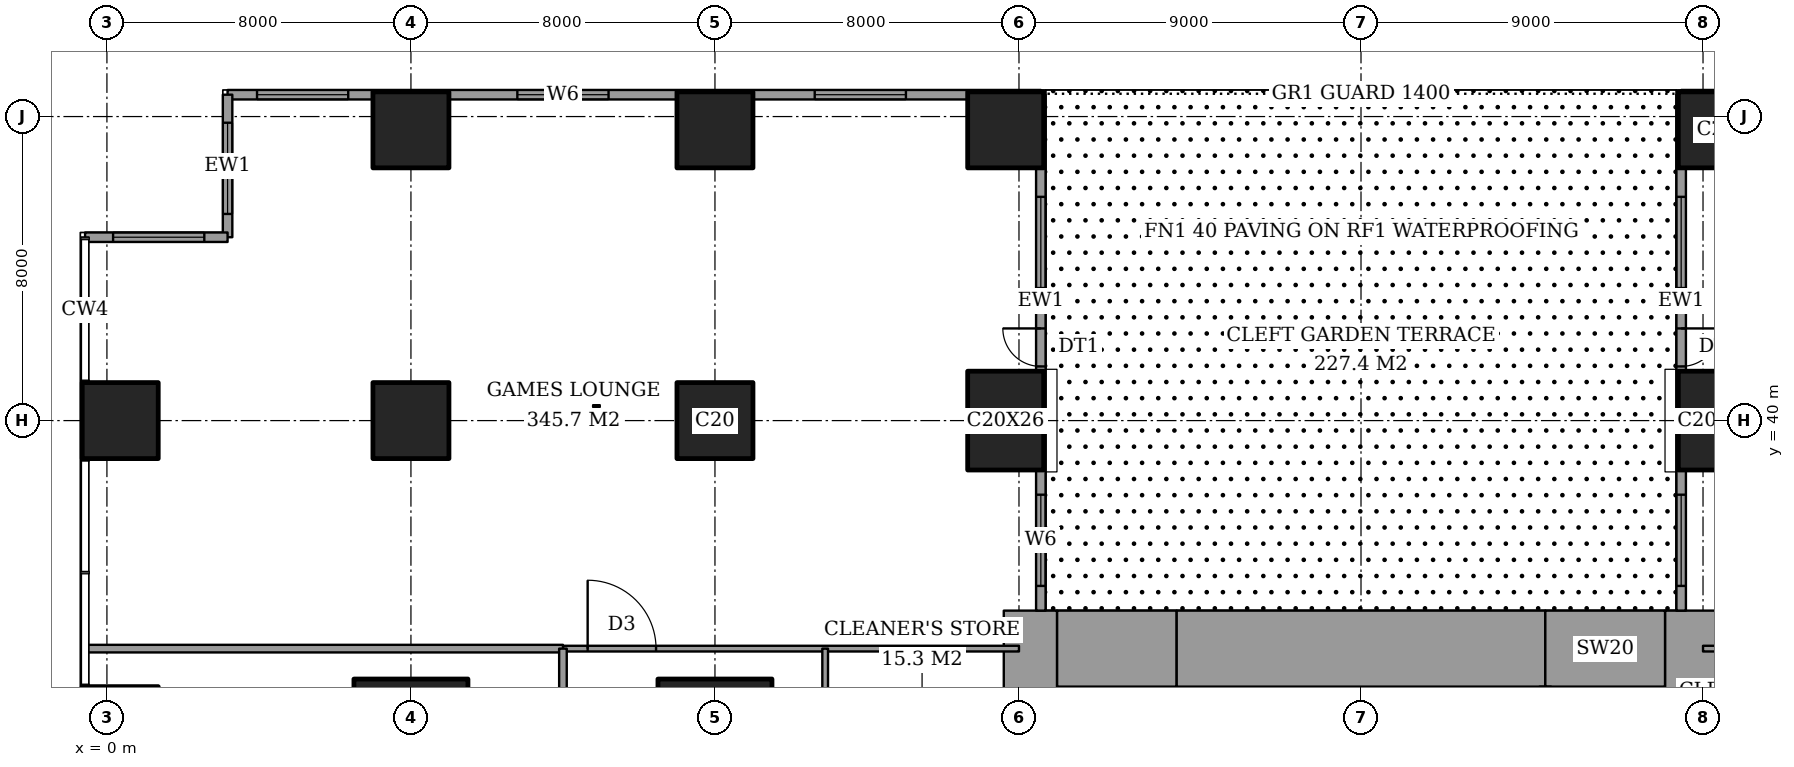
"""IFC4 building model, lengths in metres.
Left out: names, types, materials, properties, quantities, classifications, styles, units other than length and angle.
Written with IfcOpenShell. Run it as: python <this file> out.ifc"""

import sys

from ifc_helpers import new_model, si_unit, direction, frame, frame_2d, origin, origin_2d, place, context, subcontext, project, spatial, rectangle, extrude, element, fill, save


model = new_model("IFC4")
c1 = context("Model", 3, precision=1e-05, world=origin(), true_north=direction((0.0, 1.0)))
c2 = subcontext(c1, "Body", "Model", "MODEL_VIEW")
j1 = project(units=[si_unit("LENGTHUNIT", "METRE"), si_unit("PLANEANGLEUNIT", "RADIAN")], contexts=[c1])
p1 = place(None, origin())
s1 = spatial("IfcSite", under=j1, at=p1, CompositionType="ELEMENT")
p2 = place(p1, origin())
s2 = spatial("IfcBuilding", under=s1, at=p2, CompositionType="ELEMENT")
p3 = place(p2, frame((0.0, 0.0, 26.0)))
s3 = spatial("IfcBuildingStorey", under=s2, at=p3, CompositionType="ELEMENT", Elevation=26.0)
p4 = place(p3, frame((0.35, 40.0, 0.0), z_axis=(0.0, 0.0, 1.0), x_axis=(1.0, 0.0, 0.0)))
e1 = element("IfcColumn", 1, at=p4, inside=s3, PredefinedType="COLUMN", context=c2, shape_type="SweptSolid", body=[
    extrude(rectangle(XDim=2.0, YDim=2.0, at=origin_2d()), origin(), (0.0, 0.0, 1.0), 3.6),
])
p5 = place(p3, frame((8.0, 32.0, 0.0), z_axis=(0.0, 0.0, 1.0), x_axis=(1.0, 0.0, 0.0)))
e2 = element("IfcColumn", 2, at=p5, inside=s3, PredefinedType="COLUMN", context=c2, shape_type="SweptSolid", body=[
    extrude(rectangle(XDim=3.0, YDim=2.4, at=origin_2d()), origin(), (0.0, 0.0, 1.0), 3.6),
])
for number, where, z_axis, x_axis in (
    (3, (8.0, 40.0, 0.0), (0.0, 0.0, 1.0), (1.0, 0.0, 0.0)),
    (4, (8.0, 47.65, 0.0), (0.0, 0.0, 1.0), (1.0, 0.0, 0.0)),
):
    element("IfcColumn", number, at=place(p3, frame(where, z_axis=z_axis, x_axis=x_axis)), inside=s3, PredefinedType="COLUMN", context=c2, shape_type="SweptSolid", body=[
        extrude(rectangle(XDim=2.0, YDim=2.0, at=origin_2d()), origin(), (0.0, 0.0, 1.0), 3.6),
    ])
p6 = place(p3, frame((16.0, 32.0, 0.0), z_axis=(0.0, 0.0, 1.0), x_axis=(1.0, 0.0, 0.0)))
e5 = element("IfcColumn", 5, at=p6, inside=s3, PredefinedType="COLUMN", context=c2, shape_type="SweptSolid", body=[
    extrude(rectangle(XDim=3.0, YDim=2.4, at=origin_2d()), origin(), (0.0, 0.0, 1.0), 3.6),
])
for number, where, z_axis, x_axis in (
    (6, (16.0, 40.0, 0.0), (0.0, 0.0, 1.0), (1.0, 0.0, 0.0)),
    (7, (16.0, 47.65, 0.0), (0.0, 0.0, 1.0), (1.0, 0.0, 0.0)),
):
    element("IfcColumn", number, at=place(p3, frame(where, z_axis=z_axis, x_axis=x_axis)), inside=s3, PredefinedType="COLUMN", context=c2, shape_type="SweptSolid", body=[
        extrude(rectangle(XDim=2.0, YDim=2.0, at=origin_2d()), origin(), (0.0, 0.0, 1.0), 3.6),
    ])
p7 = place(p3, frame((23.65, 40.0, 0.0), z_axis=(0.0, 0.0, 1.0), x_axis=(1.0, 0.0, 0.0)))
e8 = element("IfcColumn", 8, at=p7, inside=s3, PredefinedType="COLUMN", context=c2, shape_type="SweptSolid", body=[
    extrude(rectangle(XDim=2.0, YDim=2.6, at=origin_2d()), origin(), (0.0, 0.0, 1.0), 3.6),
])
p8 = place(p3, frame((23.65, 47.65, 0.0), z_axis=(0.0, 0.0, 1.0), x_axis=(1.0, 0.0, 0.0)))
e9 = element("IfcColumn", 9, at=p8, inside=s3, PredefinedType="COLUMN", context=c2, shape_type="SweptSolid", body=[
    extrude(rectangle(XDim=2.0, YDim=2.0, at=origin_2d()), origin(), (0.0, 0.0, 1.0), 3.6),
])
p9 = place(p3, frame((42.35, 40.0, 0.0), z_axis=(0.0, 0.0, 1.0), x_axis=(1.0, 0.0, 0.0)))
e10 = element("IfcColumn", 10, at=p9, inside=s3, PredefinedType="COLUMN", context=c2, shape_type="SweptSolid", body=[
    extrude(rectangle(XDim=2.0, YDim=2.6, at=origin_2d()), origin(), (0.0, 0.0, 1.0), 3.6),
])
p10 = place(p3, frame((42.35, 47.65, 0.0), z_axis=(0.0, 0.0, 1.0), x_axis=(1.0, 0.0, 0.0)))
e11 = element("IfcColumn", 11, at=p10, inside=s3, PredefinedType="COLUMN", context=c2, shape_type="SweptSolid", body=[
    extrude(rectangle(XDim=2.0, YDim=2.0, at=origin_2d()), origin(), (0.0, 0.0, 1.0), 3.6),
])
p11 = place(p3, frame((25.0, 34.0, 0.0), z_axis=(0.0, 0.0, 1.0), x_axis=(1.0, 0.0, 0.0)))
e12 = element("IfcWall", 12, at=p11, inside=s3, PredefinedType="SHEAR", context=c2, shape_type="SweptSolid", body=[
    extrude(rectangle(XDim=3.15, YDim=2.0, at=frame_2d((1.575, 0.0))), origin(), (0.0, 0.0, 1.0), 3.6),
])
p12 = place(p3, frame((28.15, 34.0, 0.0), z_axis=(0.0, 0.0, 1.0), x_axis=(1.0, 0.0, 0.0)))
e13 = element("IfcWall", 13, at=p12, inside=s3, PredefinedType="SHEAR", context=c2, shape_type="SweptSolid", body=[
    extrude(rectangle(XDim=9.7, YDim=2.0, at=frame_2d((4.85, 0.0))), origin(), (0.0, 0.0, 1.0), 3.6),
])
p13 = place(p3, frame((37.85, 34.0, 0.0), z_axis=(0.0, 0.0, 1.0), x_axis=(1.0, 0.0, 0.0)))
e14 = element("IfcWall", 14, at=p13, inside=s3, PredefinedType="SHEAR", context=c2, shape_type="SweptSolid", body=[
    extrude(rectangle(XDim=3.15, YDim=2.0, at=frame_2d((1.575, 0.0))), origin(), (0.0, 0.0, 1.0), 3.6),
])
p14 = place(p3, frame((24.3, 23.15, 0.0), z_axis=(0.0, 0.0, 1.0), x_axis=(0.0, 1.0, 0.0)))
e15 = element("IfcWall", 15, at=p14, inside=s3, PredefinedType="SHEAR", context=c2, shape_type="SweptSolid", body=[
    extrude(rectangle(XDim=11.85, YDim=1.4, at=frame_2d((5.925, 0.0))), origin(), (0.0, 0.0, 1.0), 3.6),
])
p15 = place(p14, frame((0.75, 0.0, 0.0)))
e16 = element("IfcOpeningElement", 16, at=p15, cuts=e15, PredefinedType="OPENING", context=c2, shape_type="SweptSolid", body=[
    extrude(rectangle(XDim=1.8, YDim=2.4, at=frame_2d((0.9, 1.2))), frame((0.0, 0.71, 0.0), z_axis=(0.0, -1.0, 0.0), x_axis=(1.0, 0.0, 0.0)), (0.0, 0.0, 1.0), 1.42),
])
p16 = place(p3, frame((41.7, 24.85, 0.0), z_axis=(0.0, 0.0, 1.0), x_axis=(0.0, 1.0, 0.0)))
e17 = element("IfcWall", 17, at=p16, inside=s3, PredefinedType="SHEAR", context=c2, shape_type="SweptSolid", body=[
    extrude(rectangle(XDim=10.15, YDim=1.4, at=frame_2d((5.075, 0.0))), origin(), (0.0, 0.0, 1.0), 3.6),
])
p17 = place(p3, frame((62.825, 48.575, 0.0), z_axis=(0.0, 0.0, 1.0), x_axis=(-1.0, 0.0, 0.0)))
e18 = element("IfcWall", 18, at=p17, inside=s3, PredefinedType="SOLIDWALL", context=c2, shape_type="SweptSolid", body=[
    extrude(rectangle(XDim=21.4, YDim=0.25, at=frame_2d((10.7, 0.0))), origin(), (0.0, 0.0, 1.0), 3.6),
])
p18 = place(p17, frame((0.725, 0.0, 0.6)))
e19 = element("IfcOpeningElement", 19, at=p18, cuts=e18, PredefinedType="OPENING", context=c2, shape_type="SweptSolid", body=[
    extrude(rectangle(XDim=2.4, YDim=2.0, at=frame_2d((1.2, 1.0))), frame((0.0, 0.135, 0.0), z_axis=(0.0, -1.0, 0.0), x_axis=(1.0, 0.0, 0.0)), (0.0, 0.0, 1.0), 0.27),
])
p19 = place(p17, frame((7.625, 0.0, 0.6)))
e20 = element("IfcOpeningElement", 20, at=p19, cuts=e18, PredefinedType="OPENING", context=c2, shape_type="SweptSolid", body=[
    extrude(rectangle(XDim=2.4, YDim=2.0, at=frame_2d((1.2, 1.0))), frame((0.0, 0.135, 0.0), z_axis=(0.0, -1.0, 0.0), x_axis=(1.0, 0.0, 0.0)), (0.0, 0.0, 1.0), 0.27),
])
p20 = place(p17, frame((15.5, 0.0, 0.6)))
e21 = element("IfcOpeningElement", 21, at=p20, cuts=e18, PredefinedType="OPENING", context=c2, shape_type="SweptSolid", body=[
    extrude(rectangle(XDim=2.4, YDim=2.0, at=frame_2d((1.2, 1.0))), frame((0.0, 0.135, 0.0), z_axis=(0.0, -1.0, 0.0), x_axis=(1.0, 0.0, 0.0)), (0.0, 0.0, 1.0), 0.27),
])
p21 = place(p3, frame((41.425, 48.575, 0.0), z_axis=(0.0, 0.0, 1.0), x_axis=(0.0, -1.0, 0.0)))
e22 = element("IfcWall", 22, at=p21, inside=s3, PredefinedType="SOLIDWALL", context=c2, shape_type="SweptSolid", body=[
    extrude(rectangle(XDim=13.575, YDim=0.25, at=frame_2d((6.788, 0.0))), origin(), (0.0, 0.0, 1.0), 3.6),
])
p22 = place(p21, frame((6.15, 0.0, 0.0)))
e23 = element("IfcOpeningElement", 23, at=p22, cuts=e22, PredefinedType="OPENING", context=c2, shape_type="SweptSolid", body=[
    extrude(rectangle(XDim=1.0, YDim=2.4, at=frame_2d((0.5, 1.2))), frame((0.0, 0.135, 0.0), z_axis=(0.0, -1.0, 0.0), x_axis=(1.0, 0.0, 0.0)), (0.0, 0.0, 1.0), 0.27),
])
p23 = place(p21, frame((2.688, 0.0, 0.6)))
e24 = element("IfcOpeningElement", 24, at=p23, cuts=e22, PredefinedType="OPENING", context=c2, shape_type="SweptSolid", body=[
    extrude(rectangle(XDim=2.4, YDim=2.0, at=frame_2d((1.2, 1.0))), frame((0.0, 0.135, 0.0), z_axis=(0.0, -1.0, 0.0), x_axis=(1.0, 0.0, 0.0)), (0.0, 0.0, 1.0), 0.27),
])
p24 = place(p21, frame((10.525, 0.0, 0.6)))
e25 = element("IfcOpeningElement", 25, at=p24, cuts=e22, PredefinedType="OPENING", context=c2, shape_type="SweptSolid", body=[
    extrude(rectangle(XDim=2.4, YDim=2.0, at=frame_2d((1.2, 1.0))), frame((0.0, 0.135, 0.0), z_axis=(0.0, -1.0, 0.0), x_axis=(1.0, 0.0, 0.0)), (0.0, 0.0, 1.0), 0.27),
])
p25 = place(p3, frame((24.575, 35.0, 0.0), z_axis=(0.0, 0.0, 1.0), x_axis=(0.0, 1.0, 0.0)))
e26 = element("IfcWall", 26, at=p25, inside=s3, PredefinedType="SOLIDWALL", context=c2, shape_type="SweptSolid", body=[
    extrude(rectangle(XDim=13.575, YDim=0.25, at=frame_2d((6.788, 0.0))), origin(), (0.0, 0.0, 1.0), 3.6),
])
p26 = place(p25, frame((6.425, 0.0, 0.0)))
e27 = element("IfcOpeningElement", 27, at=p26, cuts=e26, PredefinedType="OPENING", context=c2, shape_type="SweptSolid", body=[
    extrude(rectangle(XDim=1.0, YDim=2.4, at=frame_2d((0.5, 1.2))), frame((0.0, 0.135, 0.0), z_axis=(0.0, -1.0, 0.0), x_axis=(1.0, 0.0, 0.0)), (0.0, 0.0, 1.0), 0.27),
])
p27 = place(p25, frame((0.65, 0.0, 0.6)))
e28 = element("IfcOpeningElement", 28, at=p27, cuts=e26, PredefinedType="OPENING", context=c2, shape_type="SweptSolid", body=[
    extrude(rectangle(XDim=2.4, YDim=2.0, at=frame_2d((1.2, 1.0))), frame((0.0, 0.135, 0.0), z_axis=(0.0, -1.0, 0.0), x_axis=(1.0, 0.0, 0.0)), (0.0, 0.0, 1.0), 0.27),
])
p28 = place(p25, frame((8.488, 0.0, 0.6)))
e29 = element("IfcOpeningElement", 29, at=p28, cuts=e26, PredefinedType="OPENING", context=c2, shape_type="SweptSolid", body=[
    extrude(rectangle(XDim=2.4, YDim=2.0, at=frame_2d((1.2, 1.0))), frame((0.0, 0.135, 0.0), z_axis=(0.0, -1.0, 0.0), x_axis=(1.0, 0.0, 0.0)), (0.0, 0.0, 1.0), 0.27),
])
p29 = place(p3, frame((24.575, 48.575, 0.0), z_axis=(0.0, 0.0, 1.0), x_axis=(-1.0, 0.0, 0.0)))
e30 = element("IfcWall", 30, at=p29, inside=s3, PredefinedType="SOLIDWALL", context=c2, shape_type="SweptSolid", body=[
    extrude(rectangle(XDim=21.4, YDim=0.25, at=frame_2d((10.7, 0.0))), origin(), (0.0, 0.0, 1.0), 3.6),
])
p30 = place(p29, frame((3.55, 0.0, 0.6)))
e31 = element("IfcOpeningElement", 31, at=p30, cuts=e30, PredefinedType="OPENING", context=c2, shape_type="SweptSolid", body=[
    extrude(rectangle(XDim=2.4, YDim=2.0, at=frame_2d((1.2, 1.0))), frame((0.0, 0.135, 0.0), z_axis=(0.0, -1.0, 0.0), x_axis=(1.0, 0.0, 0.0)), (0.0, 0.0, 1.0), 0.27),
])
p31 = place(p29, frame((11.375, 0.0, 0.6)))
e32 = element("IfcOpeningElement", 32, at=p31, cuts=e30, PredefinedType="OPENING", context=c2, shape_type="SweptSolid", body=[
    extrude(rectangle(XDim=2.4, YDim=2.0, at=frame_2d((1.2, 1.0))), frame((0.0, 0.135, 0.0), z_axis=(0.0, -1.0, 0.0), x_axis=(1.0, 0.0, 0.0)), (0.0, 0.0, 1.0), 0.27),
])
p32 = place(p29, frame((18.225, 0.0, 0.6)))
e33 = element("IfcOpeningElement", 33, at=p32, cuts=e30, PredefinedType="OPENING", context=c2, shape_type="SweptSolid", body=[
    extrude(rectangle(XDim=2.4, YDim=2.0, at=frame_2d((1.2, 1.0))), frame((0.0, 0.135, 0.0), z_axis=(0.0, -1.0, 0.0), x_axis=(1.0, 0.0, 0.0)), (0.0, 0.0, 1.0), 0.27),
])
p33 = place(p3, frame((3.175, 48.575, 0.0), z_axis=(0.0, 0.0, 1.0), x_axis=(0.0, -1.0, 0.0)))
e34 = element("IfcWall", 34, at=p33, inside=s3, PredefinedType="SOLIDWALL", context=c2, shape_type="SweptSolid", body=[
    extrude(rectangle(XDim=3.75, YDim=0.25, at=frame_2d((1.875, 0.0))), origin(), (0.0, 0.0, 1.0), 3.6),
])
p34 = place(p33, frame((0.738, 0.0, 0.6)))
e35 = element("IfcOpeningElement", 35, at=p34, cuts=e34, PredefinedType="OPENING", context=c2, shape_type="SweptSolid", body=[
    extrude(rectangle(XDim=2.4, YDim=2.0, at=frame_2d((1.2, 1.0))), frame((0.0, 0.135, 0.0), z_axis=(0.0, -1.0, 0.0), x_axis=(1.0, 0.0, 0.0)), (0.0, 0.0, 1.0), 0.27),
])
p35 = place(p3, frame((3.175, 44.825, 0.0), z_axis=(0.0, 0.0, 1.0), x_axis=(-1.0, 0.0, 0.0)))
e36 = element("IfcWall", 36, at=p35, inside=s3, PredefinedType="SOLIDWALL", context=c2, shape_type="SweptSolid", body=[
    extrude(rectangle(XDim=3.75, YDim=0.25, at=frame_2d((1.875, 0.0))), origin(), (0.0, 0.0, 1.0), 3.6),
])
p36 = place(p35, frame((0.613, 0.0, 0.6)))
e37 = element("IfcOpeningElement", 37, at=p36, cuts=e36, PredefinedType="OPENING", context=c2, shape_type="SweptSolid", body=[
    extrude(rectangle(XDim=2.4, YDim=2.0, at=frame_2d((1.2, 1.0))), frame((0.0, 0.135, 0.0), z_axis=(0.0, -1.0, 0.0), x_axis=(1.0, 0.0, 0.0)), (0.0, 0.0, 1.0), 0.27),
])
p37 = place(p3, frame((-0.561, 34.0, 0.0), z_axis=(0.0, 0.0, 1.0), x_axis=(1.0, 0.0, 0.0)))
e38 = element("IfcWall", 38, at=p37, inside=s3, PredefinedType="PARTITIONING", context=c2, shape_type="SweptSolid", body=[
    extrude(rectangle(XDim=12.561, YDim=0.2, at=frame_2d((6.281, 0.0))), origin(), (0.0, 0.0, 1.0), 3.35),
])
p38 = place(p3, frame((12.0, 34.0, 0.0), z_axis=(0.0, 0.0, 1.0), x_axis=(1.0, 0.0, 0.0)))
e39 = element("IfcWall", 39, at=p38, inside=s3, PredefinedType="PARTITIONING", context=c2, shape_type="SweptSolid", body=[
    extrude(rectangle(XDim=12.0, YDim=0.15, at=frame_2d((6.0, 0.0))), origin(), (0.0, 0.0, 1.0), 3.35),
])
p39 = place(p38, frame((0.65, 0.0, 0.0)))
e40 = element("IfcOpeningElement", 40, at=p39, cuts=e39, PredefinedType="OPENING", context=c2, shape_type="SweptSolid", body=[
    extrude(rectangle(XDim=1.8, YDim=2.1, at=frame_2d((0.9, 1.05))), frame((0.0, 0.085, 0.0), z_axis=(0.0, -1.0, 0.0), x_axis=(1.0, 0.0, 0.0)), (0.0, 0.0, 1.0), 0.17),
])
p40 = place(p3, frame((42.0, 34.0, 0.0), z_axis=(0.0, 0.0, 1.0), x_axis=(1.0, 0.0, 0.0)))
e41 = element("IfcWall", 41, at=p40, inside=s3, PredefinedType="PARTITIONING", context=c2, shape_type="SweptSolid", body=[
    extrude(rectangle(XDim=12.0, YDim=0.15, at=frame_2d((6.0, 0.0))), origin(), (0.0, 0.0, 1.0), 3.35),
])
p41 = place(p40, frame((9.55, 0.0, 0.0)))
e42 = element("IfcOpeningElement", 42, at=p41, cuts=e41, PredefinedType="OPENING", context=c2, shape_type="SweptSolid", body=[
    extrude(rectangle(XDim=1.8, YDim=2.1, at=frame_2d((0.9, 1.05))), frame((0.0, 0.085, 0.0), z_axis=(0.0, -1.0, 0.0), x_axis=(1.0, 0.0, 0.0)), (0.0, 0.0, 1.0), 0.17),
])
p42 = place(p3, frame((12.0, 28.725, 0.0), z_axis=(0.0, 0.0, 1.0), x_axis=(0.0, 1.0, 0.0)))
e43 = element("IfcWall", 43, at=p42, inside=s3, PredefinedType="PARTITIONING", context=c2, shape_type="SweptSolid", body=[
    extrude(rectangle(XDim=5.275, YDim=0.2, at=frame_2d((2.637, 0.0))), origin(), (0.0, 0.0, 1.0), 3.35),
])
p43 = place(p3, frame((18.9, 31.0, 0.0), z_axis=(0.0, 0.0, 1.0), x_axis=(0.0, 1.0, 0.0)))
e44 = element("IfcWall", 44, at=p43, inside=s3, PredefinedType="PARTITIONING", context=c2, shape_type="SweptSolid", body=[
    extrude(rectangle(XDim=3.0, YDim=0.15, at=frame_2d((1.5, 0.0))), origin(), (0.0, 0.0, 1.0), 3.35),
])
p44 = place(p43, frame((1.05, 0.0, 0.0)))
e45 = element("IfcOpeningElement", 45, at=p44, cuts=e44, PredefinedType="OPENING", context=c2, shape_type="SweptSolid", body=[
    extrude(rectangle(XDim=0.9, YDim=2.1, at=frame_2d((0.45, 1.05))), frame((0.0, 0.085, 0.0), z_axis=(0.0, -1.0, 0.0), x_axis=(1.0, 0.0, 0.0)), (0.0, 0.0, 1.0), 0.17),
])
p45 = place(p22, origin())
e46 = element("IfcDoor", 46, at=p45, inside=s3, OperationType="SINGLE_SWING_RIGHT", PredefinedType="DOOR", context=c2, shape_type="SweptSolid", body=[
    extrude(rectangle(XDim=1.0, YDim=2.4, at=frame_2d((0.5, 1.2))), frame((0.0, 0.025, 0.0), z_axis=(0.0, -1.0, 0.0), x_axis=(1.0, 0.0, 0.0)), (0.0, 0.0, 1.0), 0.05),
])
fill(e23, e46)
p46 = place(p23, origin())
e47 = element("IfcWindow", 47, at=p46, inside=s3, PartitioningType="SINGLE_PANEL", PredefinedType="WINDOW", context=c2, shape_type="SweptSolid", body=[
    extrude(rectangle(XDim=2.4, YDim=2.0, at=frame_2d((1.2, 1.0))), frame((0.0, 0.03, 0.0), z_axis=(0.0, -1.0, 0.0), x_axis=(1.0, 0.0, 0.0)), (0.0, 0.0, 1.0), 0.06),
])
fill(e24, e47)
p47 = place(p24, origin())
e48 = element("IfcWindow", 48, at=p47, inside=s3, PartitioningType="SINGLE_PANEL", PredefinedType="WINDOW", context=c2, shape_type="SweptSolid", body=[
    extrude(rectangle(XDim=2.4, YDim=2.0, at=frame_2d((1.2, 1.0))), frame((0.0, 0.03, 0.0), z_axis=(0.0, -1.0, 0.0), x_axis=(1.0, 0.0, 0.0)), (0.0, 0.0, 1.0), 0.06),
])
fill(e25, e48)
p48 = place(p26, origin())
e49 = element("IfcDoor", 49, at=p48, inside=s3, OperationType="SINGLE_SWING_LEFT", PredefinedType="DOOR", context=c2, shape_type="SweptSolid", body=[
    extrude(rectangle(XDim=1.0, YDim=2.4, at=frame_2d((0.5, 1.2))), frame((0.0, 0.025, 0.0), z_axis=(0.0, -1.0, 0.0), x_axis=(1.0, 0.0, 0.0)), (0.0, 0.0, 1.0), 0.05),
])
fill(e27, e49)
p49 = place(p27, origin())
e50 = element("IfcWindow", 50, at=p49, inside=s3, PartitioningType="SINGLE_PANEL", PredefinedType="WINDOW", context=c2, shape_type="SweptSolid", body=[
    extrude(rectangle(XDim=2.4, YDim=2.0, at=frame_2d((1.2, 1.0))), frame((0.0, 0.03, 0.0), z_axis=(0.0, -1.0, 0.0), x_axis=(1.0, 0.0, 0.0)), (0.0, 0.0, 1.0), 0.06),
])
fill(e28, e50)
p50 = place(p28, origin())
e51 = element("IfcWindow", 51, at=p50, inside=s3, PartitioningType="SINGLE_PANEL", PredefinedType="WINDOW", context=c2, shape_type="SweptSolid", body=[
    extrude(rectangle(XDim=2.4, YDim=2.0, at=frame_2d((1.2, 1.0))), frame((0.0, 0.03, 0.0), z_axis=(0.0, -1.0, 0.0), x_axis=(1.0, 0.0, 0.0)), (0.0, 0.0, 1.0), 0.06),
])
fill(e29, e51)
p51 = place(p30, origin())
e52 = element("IfcWindow", 52, at=p51, inside=s3, PartitioningType="SINGLE_PANEL", PredefinedType="WINDOW", context=c2, shape_type="SweptSolid", body=[
    extrude(rectangle(XDim=2.4, YDim=2.0, at=frame_2d((1.2, 1.0))), frame((0.0, 0.03, 0.0), z_axis=(0.0, -1.0, 0.0), x_axis=(1.0, 0.0, 0.0)), (0.0, 0.0, 1.0), 0.06),
])
fill(e31, e52)
p52 = place(p31, origin())
e53 = element("IfcWindow", 53, at=p52, inside=s3, PartitioningType="SINGLE_PANEL", PredefinedType="WINDOW", context=c2, shape_type="SweptSolid", body=[
    extrude(rectangle(XDim=2.4, YDim=2.0, at=frame_2d((1.2, 1.0))), frame((0.0, 0.03, 0.0), z_axis=(0.0, -1.0, 0.0), x_axis=(1.0, 0.0, 0.0)), (0.0, 0.0, 1.0), 0.06),
])
fill(e32, e53)
p53 = place(p32, origin())
e54 = element("IfcWindow", 54, at=p53, inside=s3, PartitioningType="SINGLE_PANEL", PredefinedType="WINDOW", context=c2, shape_type="SweptSolid", body=[
    extrude(rectangle(XDim=2.4, YDim=2.0, at=frame_2d((1.2, 1.0))), frame((0.0, 0.03, 0.0), z_axis=(0.0, -1.0, 0.0), x_axis=(1.0, 0.0, 0.0)), (0.0, 0.0, 1.0), 0.06),
])
fill(e33, e54)
p54 = place(p34, origin())
e55 = element("IfcWindow", 55, at=p54, inside=s3, PartitioningType="SINGLE_PANEL", PredefinedType="WINDOW", context=c2, shape_type="SweptSolid", body=[
    extrude(rectangle(XDim=2.4, YDim=2.0, at=frame_2d((1.2, 1.0))), frame((0.0, 0.03, 0.0), z_axis=(0.0, -1.0, 0.0), x_axis=(1.0, 0.0, 0.0)), (0.0, 0.0, 1.0), 0.06),
])
fill(e35, e55)
p55 = place(p36, origin())
e56 = element("IfcWindow", 56, at=p55, inside=s3, PartitioningType="SINGLE_PANEL", PredefinedType="WINDOW", context=c2, shape_type="SweptSolid", body=[
    extrude(rectangle(XDim=2.4, YDim=2.0, at=frame_2d((1.2, 1.0))), frame((0.0, 0.03, 0.0), z_axis=(0.0, -1.0, 0.0), x_axis=(1.0, 0.0, 0.0)), (0.0, 0.0, 1.0), 0.06),
])
fill(e37, e56)
p56 = place(p39, origin())
e57 = element("IfcDoor", 57, at=p56, inside=s3, OperationType="DOUBLE_DOOR_DOUBLE_SWING", PredefinedType="DOOR", context=c2, shape_type="SweptSolid", body=[
    extrude(rectangle(XDim=1.8, YDim=2.1, at=frame_2d((0.9, 1.05))), frame((0.0, 0.025, 0.0), z_axis=(0.0, -1.0, 0.0), x_axis=(1.0, 0.0, 0.0)), (0.0, 0.0, 1.0), 0.05),
])
fill(e40, e57)
save(model, sys.argv[1])
